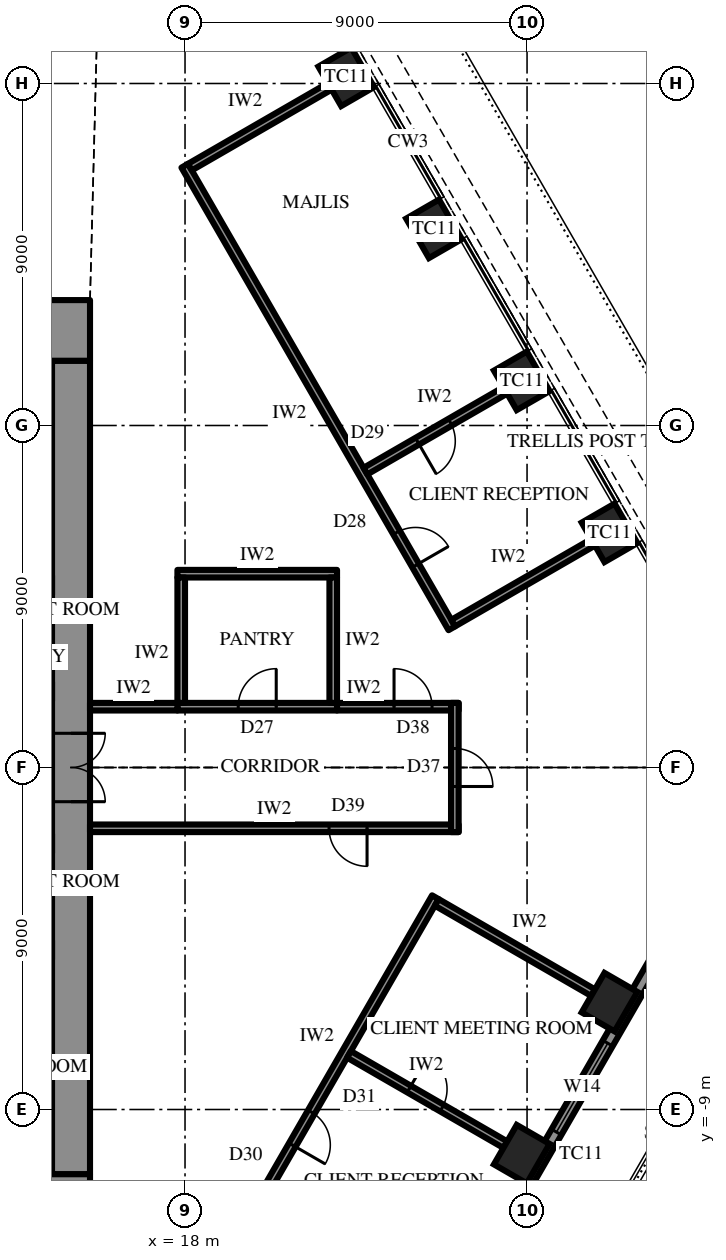
"""IFC4 building model, lengths in metres.
Left out: names, types, materials, properties, quantities, classifications, styles, units other than length and angle.
Written with IfcOpenShell. Run it as: python <this file> out.ifc"""

import sys

from ifc_helpers import new_model, si_unit, direction, frame, frame_2d, origin, origin_2d, place, context, subcontext, project, spatial, rectangle, extrude, element, fill, save


model = new_model("IFC4")
c1 = context("Model", 3, precision=1e-05, world=origin(), true_north=direction((0.0, 1.0)))
c2 = subcontext(c1, "Body", "Model", "MODEL_VIEW")
j1 = project(units=[si_unit("LENGTHUNIT", "METRE"), si_unit("PLANEANGLEUNIT", "RADIAN")], contexts=[c1])
p1 = place(None, origin())
s1 = spatial("IfcSite", under=j1, at=p1, CompositionType="ELEMENT")
p2 = place(p1, origin())
s2 = spatial("IfcBuilding", under=s1, at=p2, CompositionType="ELEMENT")
p3 = place(p2, frame((0.0, 0.0, 257.5)))
s3 = spatial("IfcBuildingStorey", under=s2, at=p3, CompositionType="ELEMENT", Elevation=257.5)
for number, where, z_axis, x_axis in (
    (1, (29.171, 6.175, 0.0), (0.0, 0.0, 1.0), (-0.5, 0.866, 0.0)),
    (2, (26.861, 10.175, 0.0), (0.0, 0.0, 1.0), (-0.5, 0.866, 0.0)),
    (3, (24.552, 14.175, 0.0), (0.0, 0.0, 1.0), (-0.5, 0.866, 0.0)),
    (4, (22.242, 18.175, 0.0), (0.0, 0.0, 1.0), (-0.5, 0.866, 0.0)),
    (5, (26.861, -10.175, 0.0), (0.0, 0.0, 1.0), (0.5, 0.866, 0.0)),
    (6, (29.171, -6.175, 0.0), (0.0, 0.0, 1.0), (0.5, 0.866, 0.0)),
):
    element("IfcColumn", number, at=place(p3, frame(where, z_axis=z_axis, x_axis=x_axis)), inside=s3, PredefinedType="COLUMN", context=c2, shape_type="SweptSolid", body=[
        extrude(rectangle(XDim=1.2, YDim=1.0, at=origin_2d()), origin(), (0.0, 0.0, 1.0), 4.2),
    ])
p4 = place(p3, frame((-15.5, 11.5, 0.0), z_axis=(0.0, 0.0, 1.0), x_axis=(1.0, 0.0, 0.0)))
e7 = element("IfcWall", 7, at=p4, inside=s3, PredefinedType="SHEAR", context=c2, shape_type="SweptSolid", body=[
    extrude(rectangle(XDim=31.0, YDim=1.6, at=frame_2d((15.5, 0.0))), origin(), (0.0, 0.0, 1.0), 4.2),
])
p5 = place(p4, frame((16.35, 0.0, 0.0)))
e8 = element("IfcOpeningElement", 8, at=p5, cuts=e7, PredefinedType="OPENING", context=c2, shape_type="SweptSolid", body=[
    extrude(rectangle(XDim=0.9, YDim=2.2, at=frame_2d((0.45, 1.1))), frame((0.0, 0.81, 0.0), z_axis=(0.0, -1.0, 0.0), x_axis=(1.0, 0.0, 0.0)), (0.0, 0.0, 1.0), 1.62),
])
p6 = place(p4, frame((19.35, 0.0, 0.0)))
e9 = element("IfcOpeningElement", 9, at=p6, cuts=e7, PredefinedType="OPENING", context=c2, shape_type="SweptSolid", body=[
    extrude(rectangle(XDim=0.9, YDim=2.2, at=frame_2d((0.45, 1.1))), frame((0.0, 0.81, 0.0), z_axis=(0.0, -1.0, 0.0), x_axis=(1.0, 0.0, 0.0)), (0.0, 0.0, 1.0), 1.62),
])
p7 = place(p4, frame((22.4, 0.0, 0.0)))
e10 = element("IfcOpeningElement", 10, at=p7, cuts=e7, PredefinedType="OPENING", context=c2, shape_type="SweptSolid", body=[
    extrude(rectangle(XDim=1.0, YDim=2.2, at=frame_2d((0.5, 1.1))), frame((0.0, 0.81, 0.0), z_axis=(0.0, -1.0, 0.0), x_axis=(1.0, 0.0, 0.0)), (0.0, 0.0, 1.0), 1.62),
])
p8 = place(p4, frame((1.65, 0.0, 0.0)))
e11 = element("IfcOpeningElement", 11, at=p8, cuts=e7, PredefinedType="OPENING", context=c2, shape_type="SweptSolid", body=[
    extrude(rectangle(XDim=0.9, YDim=2.2, at=frame_2d((0.45, 1.1))), frame((0.0, 0.81, 0.0), z_axis=(0.0, -1.0, 0.0), x_axis=(1.0, 0.0, 0.0)), (0.0, 0.0, 1.0), 1.62),
])
p9 = place(p4, frame((4.65, 0.0, 0.0)))
e12 = element("IfcOpeningElement", 12, at=p9, cuts=e7, PredefinedType="OPENING", context=c2, shape_type="SweptSolid", body=[
    extrude(rectangle(XDim=0.9, YDim=2.2, at=frame_2d((0.45, 1.1))), frame((0.0, 0.81, 0.0), z_axis=(0.0, -1.0, 0.0), x_axis=(1.0, 0.0, 0.0)), (0.0, 0.0, 1.0), 1.62),
])
p10 = place(p4, frame((25.45, 0.0, 0.0)))
e13 = element("IfcOpeningElement", 13, at=p10, cuts=e7, PredefinedType="OPENING", context=c2, shape_type="SweptSolid", body=[
    extrude(rectangle(XDim=0.9, YDim=2.2, at=frame_2d((0.45, 1.1))), frame((0.0, 0.81, 0.0), z_axis=(0.0, -1.0, 0.0), x_axis=(1.0, 0.0, 0.0)), (0.0, 0.0, 1.0), 1.62),
])
p11 = place(p4, frame((28.45, 0.0, 0.0)))
e14 = element("IfcOpeningElement", 14, at=p11, cuts=e7, PredefinedType="OPENING", context=c2, shape_type="SweptSolid", body=[
    extrude(rectangle(XDim=0.9, YDim=2.2, at=frame_2d((0.45, 1.1))), frame((0.0, 0.81, 0.0), z_axis=(0.0, -1.0, 0.0), x_axis=(1.0, 0.0, 0.0)), (0.0, 0.0, 1.0), 1.62),
])
p12 = place(p3, frame((15.5, -11.5, 0.0), z_axis=(0.0, 0.0, 1.0), x_axis=(-1.0, 0.0, 0.0)))
e15 = element("IfcWall", 15, at=p12, inside=s3, PredefinedType="SHEAR", context=c2, shape_type="SweptSolid", body=[
    extrude(rectangle(XDim=31.0, YDim=1.6, at=frame_2d((15.5, 0.0))), origin(), (0.0, 0.0, 1.0), 4.2),
])
p13 = place(p12, frame((16.35, 0.0, 0.0)))
e16 = element("IfcOpeningElement", 16, at=p13, cuts=e15, PredefinedType="OPENING", context=c2, shape_type="SweptSolid", body=[
    extrude(rectangle(XDim=0.9, YDim=2.2, at=frame_2d((0.45, 1.1))), frame((0.0, 0.81, 0.0), z_axis=(0.0, -1.0, 0.0), x_axis=(1.0, 0.0, 0.0)), (0.0, 0.0, 1.0), 1.62),
])
p14 = place(p12, frame((19.35, 0.0, 0.0)))
e17 = element("IfcOpeningElement", 17, at=p14, cuts=e15, PredefinedType="OPENING", context=c2, shape_type="SweptSolid", body=[
    extrude(rectangle(XDim=0.9, YDim=2.2, at=frame_2d((0.45, 1.1))), frame((0.0, 0.81, 0.0), z_axis=(0.0, -1.0, 0.0), x_axis=(1.0, 0.0, 0.0)), (0.0, 0.0, 1.0), 1.62),
])
p15 = place(p12, frame((22.4, 0.0, 0.0)))
e18 = element("IfcOpeningElement", 18, at=p15, cuts=e15, PredefinedType="OPENING", context=c2, shape_type="SweptSolid", body=[
    extrude(rectangle(XDim=1.0, YDim=2.2, at=frame_2d((0.5, 1.1))), frame((0.0, 0.81, 0.0), z_axis=(0.0, -1.0, 0.0), x_axis=(1.0, 0.0, 0.0)), (0.0, 0.0, 1.0), 1.62),
])
p16 = place(p12, frame((1.65, 0.0, 0.0)))
e19 = element("IfcOpeningElement", 19, at=p16, cuts=e15, PredefinedType="OPENING", context=c2, shape_type="SweptSolid", body=[
    extrude(rectangle(XDim=0.9, YDim=2.2, at=frame_2d((0.45, 1.1))), frame((0.0, 0.81, 0.0), z_axis=(0.0, -1.0, 0.0), x_axis=(1.0, 0.0, 0.0)), (0.0, 0.0, 1.0), 1.62),
])
p17 = place(p12, frame((4.65, 0.0, 0.0)))
e20 = element("IfcOpeningElement", 20, at=p17, cuts=e15, PredefinedType="OPENING", context=c2, shape_type="SweptSolid", body=[
    extrude(rectangle(XDim=0.9, YDim=2.2, at=frame_2d((0.45, 1.1))), frame((0.0, 0.81, 0.0), z_axis=(0.0, -1.0, 0.0), x_axis=(1.0, 0.0, 0.0)), (0.0, 0.0, 1.0), 1.62),
])
p18 = place(p12, frame((25.45, 0.0, 0.0)))
e21 = element("IfcOpeningElement", 21, at=p18, cuts=e15, PredefinedType="OPENING", context=c2, shape_type="SweptSolid", body=[
    extrude(rectangle(XDim=0.9, YDim=2.2, at=frame_2d((0.45, 1.1))), frame((0.0, 0.81, 0.0), z_axis=(0.0, -1.0, 0.0), x_axis=(1.0, 0.0, 0.0)), (0.0, 0.0, 1.0), 1.62),
])
p19 = place(p12, frame((28.45, 0.0, 0.0)))
e22 = element("IfcOpeningElement", 22, at=p19, cuts=e15, PredefinedType="OPENING", context=c2, shape_type="SweptSolid", body=[
    extrude(rectangle(XDim=0.9, YDim=2.2, at=frame_2d((0.45, 1.1))), frame((0.0, 0.81, 0.0), z_axis=(0.0, -1.0, 0.0), x_axis=(1.0, 0.0, 0.0)), (0.0, 0.0, 1.0), 1.62),
])
p20 = place(p3, frame((15.0, -10.7, 0.0), z_axis=(0.0, 0.0, 1.0), x_axis=(0.0, 1.0, 0.0)))
e23 = element("IfcWall", 23, at=p20, inside=s3, PredefinedType="SHEAR", context=c2, shape_type="SweptSolid", body=[
    extrude(rectangle(XDim=21.4, YDim=1.0, at=frame_2d((10.7, 0.0))), origin(), (0.0, 0.0, 1.0), 4.2),
])
p21 = place(p20, frame((9.8, 0.0, 0.0)))
e24 = element("IfcOpeningElement", 24, at=p21, cuts=e23, PredefinedType="OPENING", context=c2, shape_type="SweptSolid", body=[
    extrude(rectangle(XDim=1.8, YDim=2.4, at=frame_2d((0.9, 1.2))), frame((0.0, 0.51, 0.0), z_axis=(0.0, -1.0, 0.0), x_axis=(1.0, 0.0, 0.0)), (0.0, 0.0, 1.0), 1.02),
])
p22 = place(p3, frame((12.3, 2.0, 0.0), z_axis=(0.0, 0.0, 1.0), x_axis=(1.0, 0.0, 0.0)))
e25 = element("IfcWall", 25, at=p22, inside=s3, PredefinedType="SHEAR", context=c2, shape_type="SweptSolid", body=[
    extrude(rectangle(XDim=2.2, YDim=0.5, at=frame_2d((1.1, 0.0))), origin(), (0.0, 0.0, 1.0), 4.2),
])
p23 = place(p22, frame((0.8, 0.0, 0.0)))
e26 = element("IfcOpeningElement", 26, at=p23, cuts=e25, PredefinedType="OPENING", context=c2, shape_type="SweptSolid", body=[
    extrude(rectangle(XDim=0.9, YDim=2.2, at=frame_2d((0.45, 1.1))), frame((0.0, 0.26, 0.0), z_axis=(0.0, -1.0, 0.0), x_axis=(1.0, 0.0, 0.0)), (0.0, 0.0, 1.0), 0.52),
])
p24 = place(p3, frame((12.3, 4.8, 0.0), z_axis=(0.0, 0.0, 1.0), x_axis=(1.0, 0.0, 0.0)))
e27 = element("IfcWall", 27, at=p24, inside=s3, PredefinedType="SHEAR", context=c2, shape_type="SweptSolid", body=[
    extrude(rectangle(XDim=2.2, YDim=0.5, at=frame_2d((1.1, 0.0))), origin(), (0.0, 0.0, 1.0), 4.2),
])
p25 = place(p3, frame((18.707, -25.299, 0.0), z_axis=(0.0, 0.0, 1.0), x_axis=(0.500000442367, 0.866025148383, 0.0)))
e28 = element("IfcWall", 28, at=p25, inside=s3, PredefinedType="SOLIDWALL", context=c2, shape_type="SweptSolid", body=[
    extrude(rectangle(XDim=25.113, YDim=0.3, at=frame_2d((12.556, 0.0))), origin(), (0.0, 0.0, 1.0), 2.8),
])
p26 = place(p25, frame((4.278, 0.0, 0.6)))
e29 = element("IfcOpeningElement", 29, at=p26, cuts=e28, PredefinedType="OPENING", context=c2, shape_type="SweptSolid", body=[
    extrude(rectangle(XDim=2.7, YDim=1.95, at=frame_2d((1.35, 0.975))), frame((0.0, 0.16, 0.0), z_axis=(0.0, -1.0, 0.0), x_axis=(1.0, 0.0, 0.0)), (0.0, 0.0, 1.0), 0.32),
])
p27 = place(p25, frame((9.647, 0.0, 0.0)))
e30 = element("IfcOpeningElement", 30, at=p27, cuts=e28, PredefinedType="OPENING", context=c2, shape_type="SweptSolid", body=[
    extrude(rectangle(XDim=1.2, YDim=2.4, at=frame_2d((0.6, 1.2))), frame((0.0, 0.16, 0.0), z_axis=(0.0, -1.0, 0.0), x_axis=(1.0, 0.0, 0.0)), (0.0, 0.0, 1.0), 0.32),
])
p28 = place(p25, frame((13.516, 0.0, 0.6)))
e31 = element("IfcOpeningElement", 31, at=p28, cuts=e28, PredefinedType="OPENING", context=c2, shape_type="SweptSolid", body=[
    extrude(rectangle(XDim=2.7, YDim=1.95, at=frame_2d((1.35, 0.975))), frame((0.0, 0.16, 0.0), z_axis=(0.0, -1.0, 0.0), x_axis=(1.0, 0.0, 0.0)), (0.0, 0.0, 1.0), 0.32),
])
p29 = place(p25, frame((18.135, 0.0, 0.6)))
e32 = element("IfcOpeningElement", 32, at=p29, cuts=e28, PredefinedType="OPENING", context=c2, shape_type="SweptSolid", body=[
    extrude(rectangle(XDim=2.7, YDim=1.95, at=frame_2d((1.35, 0.975))), frame((0.0, 0.16, 0.0), z_axis=(0.0, -1.0, 0.0), x_axis=(1.0, 0.0, 0.0)), (0.0, 0.0, 1.0), 0.32),
])
p30 = place(p3, frame((25.021, 3.663, 0.0), z_axis=(0.0, 0.0, 1.0), x_axis=(-0.500002095642, 0.866024193862, 0.0)))
e33 = element("IfcWall", 33, at=p30, inside=s3, PredefinedType="PARTITIONING", context=c2, shape_type="SweptSolid", body=[
    extrude(rectangle(XDim=14.057, YDim=0.2, at=frame_2d((7.028, 0.0))), origin(), (0.0, 0.0, 1.0), 4.0),
])
p31 = place(p30, frame((1.909, 0.0, 0.0)))
e34 = element("IfcOpeningElement", 34, at=p31, cuts=e33, PredefinedType="OPENING", context=c2, shape_type="SweptSolid", body=[
    extrude(rectangle(XDim=1.0, YDim=2.2, at=frame_2d((0.5, 1.1))), frame((0.0, 0.11, 0.0), z_axis=(0.0, -1.0, 0.0), x_axis=(1.0, 0.0, 0.0)), (0.0, 0.0, 1.0), 0.22),
])
p32 = place(p3, frame((25.057, 3.8, 0.0), z_axis=(0.0, 0.0, 1.0), x_axis=(0.866028703517, 0.499994284652, 0.0)))
e35 = element("IfcWall", 35, at=p32, inside=s3, PredefinedType="PARTITIONING", context=c2, shape_type="SweptSolid", body=[
    extrude(rectangle(XDim=4.25, YDim=0.2, at=frame_2d((2.125, 0.0))), origin(), (0.0, 0.0, 1.0), 3.082),
])
p33 = place(p3, frame((22.748, 7.8, 0.0), z_axis=(0.0, 0.0, 1.0), x_axis=(0.866028703517, 0.499994284652, 0.0)))
e36 = element("IfcWall", 36, at=p33, inside=s3, PredefinedType="PARTITIONING", context=c2, shape_type="SweptSolid", body=[
    extrude(rectangle(XDim=4.25, YDim=0.2, at=frame_2d((2.125, 0.0))), origin(), (0.0, 0.0, 1.0), 3.082),
])
p34 = place(p33, frame((1.575, 0.0, 0.0)))
e37 = element("IfcOpeningElement", 37, at=p34, cuts=e36, PredefinedType="OPENING", context=c2, shape_type="SweptSolid", body=[
    extrude(rectangle(XDim=1.0, YDim=2.2, at=frame_2d((0.5, 1.1))), frame((0.0, 0.11, 0.0), z_axis=(0.0, -1.0, 0.0), x_axis=(1.0, 0.0, 0.0)), (0.0, 0.0, 1.0), 0.22),
])
p35 = place(p3, frame((18.129, 15.8, 0.0), z_axis=(0.0, 0.0, 1.0), x_axis=(0.866014341725, 0.50001915956, 0.0)))
e38 = element("IfcWall", 38, at=p35, inside=s3, PredefinedType="PARTITIONING", context=c2, shape_type="SweptSolid", body=[
    extrude(rectangle(XDim=4.25, YDim=0.2, at=frame_2d((2.125, 0.0))), origin(), (0.0, 0.0, 1.0), 3.082),
])
p36 = place(p3, frame((19.869, -11.587, 0.0), z_axis=(0.0, 0.0, 1.0), x_axis=(0.499989672313, 0.866031366395, 0.0)))
e39 = element("IfcWall", 39, at=p36, inside=s3, PredefinedType="PARTITIONING", context=c2, shape_type="SweptSolid", body=[
    extrude(rectangle(XDim=9.438, YDim=0.2, at=frame_2d((4.719, 0.0))), origin(), (0.0, 0.0, 1.0), 4.0),
])
p37 = place(p36, frame((1.909, 0.0, 0.0)))
e40 = element("IfcOpeningElement", 40, at=p37, cuts=e39, PredefinedType="OPENING", context=c2, shape_type="SweptSolid", body=[
    extrude(rectangle(XDim=1.0, YDim=2.2, at=frame_2d((0.5, 1.1))), frame((0.0, 0.11, 0.0), z_axis=(0.0, -1.0, 0.0), x_axis=(1.0, 0.0, 0.0)), (0.0, 0.0, 1.0), 0.22),
])
p38 = place(p3, frame((22.315, -7.55, 0.0), z_axis=(0.0, 0.0, 1.0), x_axis=(0.866020389056, -0.500008685663, 0.0)))
e41 = element("IfcWall", 41, at=p38, inside=s3, PredefinedType="PARTITIONING", context=c2, shape_type="SweptSolid", body=[
    extrude(rectangle(XDim=4.75, YDim=0.2, at=frame_2d((2.375, 0.0))), origin(), (0.0, 0.0, 1.0), 3.082),
])
p39 = place(p38, frame((1.825, 0.0, 0.0)))
e42 = element("IfcOpeningElement", 42, at=p39, cuts=e41, PredefinedType="OPENING", context=c2, shape_type="SweptSolid", body=[
    extrude(rectangle(XDim=1.0, YDim=2.2, at=frame_2d((0.5, 1.1))), frame((0.0, 0.11, 0.0), z_axis=(0.0, -1.0, 0.0), x_axis=(1.0, 0.0, 0.0)), (0.0, 0.0, 1.0), 0.22),
])
p40 = place(p3, frame((24.624, -3.55, 0.0), z_axis=(0.0, 0.0, 1.0), x_axis=(0.866020389056, -0.500008685663, 0.0)))
e43 = element("IfcWall", 43, at=p40, inside=s3, PredefinedType="PARTITIONING", context=c2, shape_type="SweptSolid", body=[
    extrude(rectangle(XDim=4.75, YDim=0.2, at=frame_2d((2.375, 0.0))), origin(), (0.0, 0.0, 1.0), 3.082),
])
p41 = place(p3, frame((17.8, 1.6, 0.0), z_axis=(0.0, 0.0, 1.0), x_axis=(1.0, 0.0, 0.0)))
e44 = element("IfcWall", 44, at=p41, inside=s3, PredefinedType="PARTITIONING", context=c2, shape_type="SweptSolid", body=[
    extrude(rectangle(XDim=4.2, YDim=0.2, at=frame_2d((2.1, 0.0))), origin(), (0.0, 0.0, 1.0), 4.0),
])
p42 = place(p41, frame((1.6, 0.0, 0.0)))
e45 = element("IfcOpeningElement", 45, at=p42, cuts=e44, PredefinedType="OPENING", context=c2, shape_type="SweptSolid", body=[
    extrude(rectangle(XDim=1.0, YDim=2.2, at=frame_2d((0.5, 1.1))), frame((0.0, 0.11, 0.0), z_axis=(0.0, -1.0, 0.0), x_axis=(1.0, 0.0, 0.0)), (0.0, 0.0, 1.0), 0.22),
])
p43 = place(p3, frame((17.8, 5.1, 0.0), z_axis=(0.0, 0.0, 1.0), x_axis=(1.0, 0.0, 0.0)))
e46 = element("IfcWall", 46, at=p43, inside=s3, PredefinedType="PARTITIONING", context=c2, shape_type="SweptSolid", body=[
    extrude(rectangle(XDim=4.2, YDim=0.2, at=frame_2d((2.1, 0.0))), origin(), (0.0, 0.0, 1.0), 4.0),
])
for number, where, z_axis, x_axis in (
    (47, (17.9, 1.7, 0.0), (0.0, 0.0, 1.0), (0.0, 1.0, 0.0)),
    (48, (21.9, 1.7, 0.0), (0.0, 0.0, 1.0), (0.0, 1.0, 0.0)),
):
    element("IfcWall", number, at=place(p3, frame(where, z_axis=z_axis, x_axis=x_axis)), inside=s3, PredefinedType="PARTITIONING", context=c2, shape_type="SweptSolid", body=[
        extrude(rectangle(XDim=3.3, YDim=0.2, at=frame_2d((1.65, 0.0))), origin(), (0.0, 0.0, 1.0), 4.0),
    ])
p44 = place(p3, frame((15.5, 1.6, 0.0), z_axis=(0.0, 0.0, 1.0), x_axis=(1.0, 0.0, 0.0)))
e49 = element("IfcWall", 49, at=p44, inside=s3, PredefinedType="PARTITIONING", context=c2, shape_type="SweptSolid", body=[
    extrude(rectangle(XDim=2.3, YDim=0.2, at=frame_2d((1.15, 0.0))), origin(), (0.0, 0.0, 1.0), 4.0),
])
p45 = place(p3, frame((22.0, 1.6, 0.0), z_axis=(0.0, 0.0, 1.0), x_axis=(1.0, 0.0, 0.0)))
e50 = element("IfcWall", 50, at=p45, inside=s3, PredefinedType="PARTITIONING", context=c2, shape_type="SweptSolid", body=[
    extrude(rectangle(XDim=3.2, YDim=0.2, at=frame_2d((1.6, 0.0))), origin(), (0.0, 0.0, 1.0), 4.0),
])
p46 = place(p45, frame((1.5, 0.0, 0.0)))
e51 = element("IfcOpeningElement", 51, at=p46, cuts=e50, PredefinedType="OPENING", context=c2, shape_type="SweptSolid", body=[
    extrude(rectangle(XDim=1.0, YDim=2.2, at=frame_2d((0.5, 1.1))), frame((0.0, 0.11, 0.0), z_axis=(0.0, -1.0, 0.0), x_axis=(1.0, 0.0, 0.0)), (0.0, 0.0, 1.0), 0.22),
])
p47 = place(p3, frame((15.5, -1.6, 0.0), z_axis=(0.0, 0.0, 1.0), x_axis=(1.0, 0.0, 0.0)))
e52 = element("IfcWall", 52, at=p47, inside=s3, PredefinedType="PARTITIONING", context=c2, shape_type="SweptSolid", body=[
    extrude(rectangle(XDim=9.7, YDim=0.2, at=frame_2d((4.85, 0.0))), origin(), (0.0, 0.0, 1.0), 4.0),
])
p48 = place(p47, frame((6.29, 0.0, 0.0)))
e53 = element("IfcOpeningElement", 53, at=p48, cuts=e52, PredefinedType="OPENING", context=c2, shape_type="SweptSolid", body=[
    extrude(rectangle(XDim=1.0, YDim=2.2, at=frame_2d((0.5, 1.1))), frame((0.0, 0.11, 0.0), z_axis=(0.0, -1.0, 0.0), x_axis=(1.0, 0.0, 0.0)), (0.0, 0.0, 1.0), 0.22),
])
p49 = place(p3, frame((25.1, -1.7, 0.0), z_axis=(0.0, 0.0, 1.0), x_axis=(0.0, 1.0, 0.0)))
e54 = element("IfcWall", 54, at=p49, inside=s3, PredefinedType="PARTITIONING", context=c2, shape_type="SweptSolid", body=[
    extrude(rectangle(XDim=3.4, YDim=0.2, at=frame_2d((1.7, 0.0))), origin(), (0.0, 0.0, 1.0), 4.0),
])
p50 = place(p49, frame((1.2, 0.0, 0.0)))
e55 = element("IfcOpeningElement", 55, at=p50, cuts=e54, PredefinedType="OPENING", context=c2, shape_type="SweptSolid", body=[
    extrude(rectangle(XDim=1.0, YDim=2.2, at=frame_2d((0.5, 1.1))), frame((0.0, 0.11, 0.0), z_axis=(0.0, -1.0, 0.0), x_axis=(1.0, 0.0, 0.0)), (0.0, 0.0, 1.0), 0.22),
])
p51 = place(p29, origin())
e56 = element("IfcWindow", 56, at=p51, inside=s3, PartitioningType="SINGLE_PANEL", PredefinedType="WINDOW", context=c2, shape_type="SweptSolid", body=[
    extrude(rectangle(XDim=2.7, YDim=1.95, at=frame_2d((1.35, 0.975))), frame((0.0, 0.03, 0.0), z_axis=(0.0, -1.0, 0.0), x_axis=(1.0, 0.0, 0.0)), (0.0, 0.0, 1.0), 0.06),
])
fill(e32, e56)
p52 = place(p21, frame((1.8, 0.0, 0.0), z_axis=(0.0, 0.0, 1.0), x_axis=(-1.0, 0.0, 0.0)))
e57 = element("IfcDoor", 57, at=p52, inside=s3, OperationType="DOUBLE_DOOR_SINGLE_SWING", PredefinedType="DOOR", context=c2, shape_type="SweptSolid", body=[
    extrude(rectangle(XDim=1.8, YDim=2.4, at=frame_2d((0.9, 1.2))), frame((0.0, 0.025, 0.0), z_axis=(0.0, -1.0, 0.0), x_axis=(1.0, 0.0, 0.0)), (0.0, 0.0, 1.0), 0.05),
])
fill(e24, e57)
p53 = place(p31, frame((1.0, 0.0, 0.0), z_axis=(0.0, 0.0, 1.0), x_axis=(-1.0, 0.0, 0.0)))
e58 = element("IfcDoor", 58, at=p53, inside=s3, OperationType="SINGLE_SWING_LEFT", PredefinedType="DOOR", context=c2, shape_type="SweptSolid", body=[
    extrude(rectangle(XDim=1.0, YDim=2.2, at=frame_2d((0.5, 1.1))), frame((0.0, 0.025, 0.0), z_axis=(0.0, -1.0, 0.0), x_axis=(1.0, 0.0, 0.0)), (0.0, 0.0, 1.0), 0.05),
])
fill(e34, e58)
p54 = place(p34, frame((1.0, 0.0, 0.0), z_axis=(0.0, 0.0, 1.0), x_axis=(-1.0, 0.0, 0.0)))
e59 = element("IfcDoor", 59, at=p54, inside=s3, OperationType="SINGLE_SWING_LEFT", PredefinedType="DOOR", context=c2, shape_type="SweptSolid", body=[
    extrude(rectangle(XDim=1.0, YDim=2.2, at=frame_2d((0.5, 1.1))), frame((0.0, 0.025, 0.0), z_axis=(0.0, -1.0, 0.0), x_axis=(1.0, 0.0, 0.0)), (0.0, 0.0, 1.0), 0.05),
])
fill(e37, e59)
p55 = place(p37, frame((1.0, 0.0, 0.0), z_axis=(0.0, 0.0, 1.0), x_axis=(-1.0, 0.0, 0.0)))
e60 = element("IfcDoor", 60, at=p55, inside=s3, OperationType="SINGLE_SWING_LEFT", PredefinedType="DOOR", context=c2, shape_type="SweptSolid", body=[
    extrude(rectangle(XDim=1.0, YDim=2.2, at=frame_2d((0.5, 1.1))), frame((0.0, 0.025, 0.0), z_axis=(0.0, -1.0, 0.0), x_axis=(1.0, 0.0, 0.0)), (0.0, 0.0, 1.0), 0.05),
])
fill(e40, e60)
p56 = place(p39, origin())
e61 = element("IfcDoor", 61, at=p56, inside=s3, OperationType="SINGLE_SWING_RIGHT", PredefinedType="DOOR", context=c2, shape_type="SweptSolid", body=[
    extrude(rectangle(XDim=1.0, YDim=2.2, at=frame_2d((0.5, 1.1))), frame((0.0, 0.025, 0.0), z_axis=(0.0, -1.0, 0.0), x_axis=(1.0, 0.0, 0.0)), (0.0, 0.0, 1.0), 0.05),
])
fill(e42, e61)
p57 = place(p42, origin())
e62 = element("IfcDoor", 62, at=p57, inside=s3, OperationType="SINGLE_SWING_LEFT", PredefinedType="DOOR", context=c2, shape_type="SweptSolid", body=[
    extrude(rectangle(XDim=1.0, YDim=2.2, at=frame_2d((0.5, 1.1))), frame((0.0, 0.025, 0.0), z_axis=(0.0, -1.0, 0.0), x_axis=(1.0, 0.0, 0.0)), (0.0, 0.0, 1.0), 0.05),
])
fill(e45, e62)
p58 = place(p46, origin())
e63 = element("IfcDoor", 63, at=p58, inside=s3, OperationType="SINGLE_SWING_RIGHT", PredefinedType="DOOR", context=c2, shape_type="SweptSolid", body=[
    extrude(rectangle(XDim=1.0, YDim=2.2, at=frame_2d((0.5, 1.1))), frame((0.0, 0.025, 0.0), z_axis=(0.0, -1.0, 0.0), x_axis=(1.0, 0.0, 0.0)), (0.0, 0.0, 1.0), 0.05),
])
fill(e51, e63)
p59 = place(p48, frame((1.0, 0.0, 0.0), z_axis=(0.0, 0.0, 1.0), x_axis=(-1.0, 0.0, 0.0)))
e64 = element("IfcDoor", 64, at=p59, inside=s3, OperationType="SINGLE_SWING_RIGHT", PredefinedType="DOOR", context=c2, shape_type="SweptSolid", body=[
    extrude(rectangle(XDim=1.0, YDim=2.2, at=frame_2d((0.5, 1.1))), frame((0.0, 0.025, 0.0), z_axis=(0.0, -1.0, 0.0), x_axis=(1.0, 0.0, 0.0)), (0.0, 0.0, 1.0), 0.05),
])
fill(e53, e64)
p60 = place(p50, frame((1.0, 0.0, 0.0), z_axis=(0.0, 0.0, 1.0), x_axis=(-1.0, 0.0, 0.0)))
e65 = element("IfcDoor", 65, at=p60, inside=s3, OperationType="SINGLE_SWING_LEFT", PredefinedType="DOOR", context=c2, shape_type="SweptSolid", body=[
    extrude(rectangle(XDim=1.0, YDim=2.2, at=frame_2d((0.5, 1.1))), frame((0.0, 0.025, 0.0), z_axis=(0.0, -1.0, 0.0), x_axis=(1.0, 0.0, 0.0)), (0.0, 0.0, 1.0), 0.05),
])
fill(e55, e65)
save(model, sys.argv[1])
